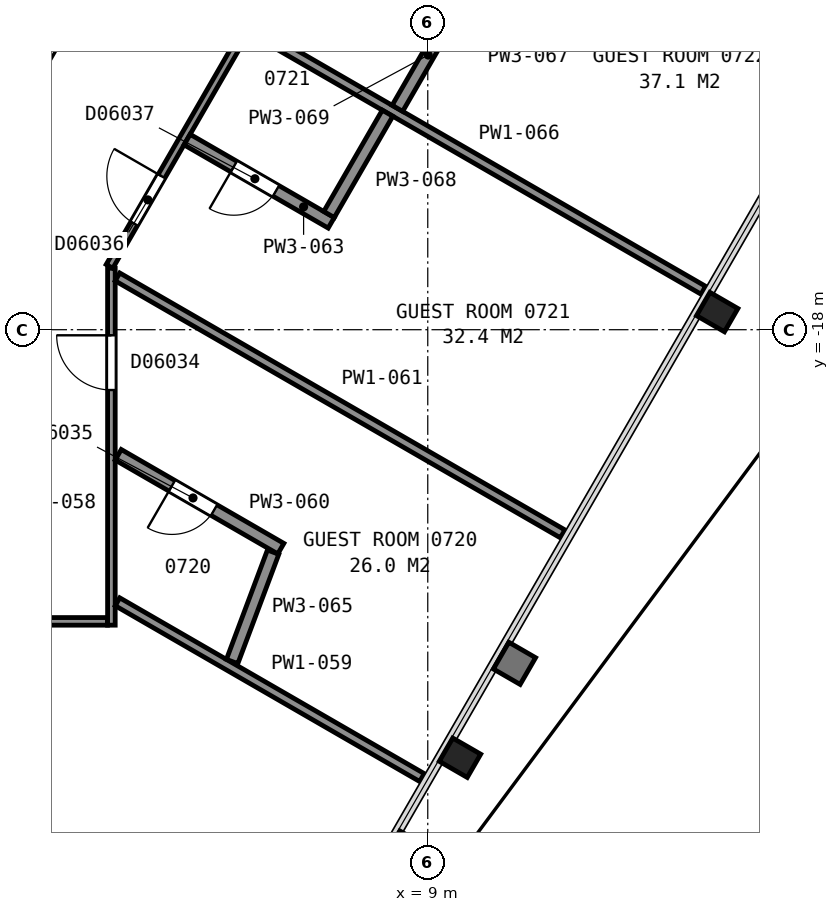
"""IFC4 building model, lengths in metres.
Left out: names, types, materials, properties, quantities, classifications, styles, units other than length and angle.
Written with IfcOpenShell. Run it as: python <this file> out.ifc"""

import sys

from ifc_helpers import new_model, si_unit, direction, frame, frame_2d, origin, origin_2d, place, context, subcontext, project, spatial, rectangle, i_section, extrude, element, fill, save


model = new_model("IFC4")
c1 = context("Model", 3, precision=1e-05, world=origin(), true_north=direction((0.0, 1.0)))
c2 = subcontext(c1, "Body", "Model", "MODEL_VIEW")
j1 = project(units=[si_unit("LENGTHUNIT", "METRE"), si_unit("PLANEANGLEUNIT", "RADIAN")], contexts=[c1])
p1 = place(None, origin())
s1 = spatial("IfcSite", under=j1, at=p1, CompositionType="ELEMENT")
p2 = place(p1, origin())
s2 = spatial("IfcBuilding", under=s1, at=p2, CompositionType="ELEMENT")
p3 = place(p2, frame((0.0, 0.0, 40.4)))
s3 = spatial("IfcBuildingStorey", under=s2, at=p3, CompositionType="ELEMENT", Elevation=40.4)
for number, where, z_axis, x_axis in (
    (1, (9.53, -25.04, 0.0), (0.0, 0.0, 1.0), (-0.5, -0.866, 0.0)),
    (2, (13.76, -17.71, 0.0), (0.0, 0.0, 1.0), (-0.5, -0.866, 0.0)),
):
    element("IfcColumn", number, at=place(p3, frame(where, z_axis=z_axis, x_axis=x_axis)), inside=s3, PredefinedType="COLUMN", context=c2, shape_type="SweptSolid", body=[
        extrude(i_section(OverallWidth=0.442, OverallDepth=0.531, WebThickness=0.066, FlangeThickness=0.106, FilletRadius=0.015, at=origin_2d()), origin(), (0.0, 0.0, 1.0), 3.575),
    ])
p4 = place(p3, frame((1.677, -14.815, 0.0), z_axis=(0.0, 0.0, 1.0), x_axis=(0.49999445743, 0.866028603765, 0.0)))
e3 = element("IfcWall", 3, at=p4, inside=s3, PredefinedType="PARTITIONING", context=c2, shape_type="SweptSolid", body=[
    extrude(rectangle(XDim=5.905, YDim=0.2, at=frame_2d((2.952, 0.0))), origin(), (0.0, 0.0, 1.0), 3.35),
])
p5 = place(p4, frame((3.855, 0.0, 0.0)))
e4 = element("IfcOpeningElement", 4, at=p5, cuts=e3, PredefinedType="OPENING", context=c2, shape_type="SweptSolid", body=[
    extrude(rectangle(XDim=1.8, YDim=2.1, at=frame_2d((0.9, 1.05))), frame((0.0, 0.11, 0.0), z_axis=(0.0, -1.0, 0.0), x_axis=(1.0, 0.0, 0.0)), (0.0, 0.0, 1.0), 0.22),
])
p6 = place(p3, frame((0.333, -22.797, 0.0), z_axis=(0.0, 0.0, 1.0), x_axis=(1.0, 0.0, 0.0)))
e5 = element("IfcWall", 5, at=p6, inside=s3, PredefinedType="PARTITIONING", context=c2, shape_type="SweptSolid", body=[
    extrude(rectangle(XDim=3.399, YDim=0.125, at=frame_2d((1.7, 0.0))), origin(), (0.0, 0.0, 1.0), 2.613),
])
p7 = place(p3, frame((3.797, -16.989, 0.0), z_axis=(0.0, 0.0, 1.0), x_axis=(0.0, -1.0, 0.0)))
e6 = element("IfcWall", 6, at=p7, inside=s3, PredefinedType="PARTITIONING", context=c2, shape_type="SweptSolid", body=[
    extrude(rectangle(XDim=5.871, YDim=0.125, at=frame_2d((2.935, 0.0))), origin(), (0.0, 0.0, 1.0), 2.613),
])
p8 = place(p7, frame((1.103, 0.0, 0.0)))
e7 = element("IfcOpeningElement", 7, at=p8, cuts=e6, PredefinedType="OPENING", context=c2, shape_type="SweptSolid", body=[
    extrude(rectangle(XDim=0.9, YDim=2.1, at=frame_2d((0.45, 1.05))), frame((0.0, 0.073, 0.0), z_axis=(0.0, -1.0, 0.0), x_axis=(1.0, 0.0, 0.0)), (0.0, 0.0, 1.0), 0.145),
])
p9 = place(p3, frame((3.897, -22.475, 0.0), z_axis=(0.0, 0.0, 1.0), x_axis=(0.866025977343, -0.499999006567, 0.0)))
e8 = element("IfcWall", 8, at=p9, inside=s3, PredefinedType="PARTITIONING", context=c2, shape_type="SweptSolid", body=[
    extrude(rectangle(XDim=5.782, YDim=0.15, at=frame_2d((2.891, 0.0))), origin(), (0.0, 0.0, 1.0), 2.613),
])
p10 = place(p3, frame((6.583, -21.601, 0.0), z_axis=(0.0, 0.0, 1.0), x_axis=(-0.865981493415, 0.500076047279, 0.0)))
e9 = element("IfcWall", 9, at=p10, inside=s3, PredefinedType="PARTITIONING", context=c2, shape_type="SweptSolid", body=[
    extrude(rectangle(XDim=3.088, YDim=0.2, at=frame_2d((1.544, 0.0))), origin(), (0.0, 0.0, 1.0), 2.613),
])
p11 = place(p10, frame((1.268, 0.0, 0.0)))
e10 = element("IfcOpeningElement", 10, at=p11, cuts=e9, PredefinedType="OPENING", context=c2, shape_type="SweptSolid", body=[
    extrude(rectangle(XDim=0.8, YDim=2.1, at=frame_2d((0.4, 1.05))), frame((0.0, 0.11, 0.0), z_axis=(0.0, -1.0, 0.0), x_axis=(1.0, 0.0, 0.0)), (0.0, 0.0, 1.0), 0.22),
])
p12 = place(p3, frame((3.897, -17.132, 0.0), z_axis=(0.0, 0.0, 1.0), x_axis=(0.866084603656, -0.499897448793, 0.0)))
e11 = element("IfcWall", 11, at=p12, inside=s3, PredefinedType="PARTITIONING", context=c2, shape_type="SweptSolid", body=[
    extrude(rectangle(XDim=8.454, YDim=0.15, at=frame_2d((4.227, 0.0))), origin(), (0.0, 0.0, 1.0), 2.613),
])
p13 = place(p3, frame((16.967, 5.906, 0.0), z_axis=(0.0, 0.0, 1.0), x_axis=(-0.500024758804, -0.866011108811, 0.0)))
e12 = element("IfcWall", 12, at=p13, inside=s3, PredefinedType="PARTITIONING", context=c2, shape_type="SweptSolid", body=[
    extrude(rectangle(XDim=26.402, YDim=0.125, at=frame_2d((13.201, 0.0))), origin(), (0.0, 0.0, 1.0), 2.613),
])
p14 = place(p13, frame((24.689, 0.0, 0.0)))
e13 = element("IfcOpeningElement", 13, at=p14, cuts=e12, PredefinedType="OPENING", context=c2, shape_type="SweptSolid", body=[
    extrude(rectangle(XDim=0.9, YDim=2.1, at=frame_2d((0.45, 1.05))), frame((0.0, 0.073, 0.0), z_axis=(0.0, -1.0, 0.0), x_axis=(1.0, 0.0, 0.0)), (0.0, 0.0, 1.0), 0.145),
])
p15 = place(p13, frame((17.709, 0.0, 0.0)))
e14 = element("IfcOpeningElement", 14, at=p15, cuts=e12, PredefinedType="OPENING", context=c2, shape_type="SweptSolid", body=[
    extrude(rectangle(XDim=0.9, YDim=2.1, at=frame_2d((0.45, 1.05))), frame((0.0, 0.073, 0.0), z_axis=(0.0, -1.0, 0.0), x_axis=(1.0, 0.0, 0.0)), (0.0, 0.0, 1.0), 0.145),
])
p16 = place(p13, frame((14.928, 0.0, 0.0)))
e15 = element("IfcOpeningElement", 15, at=p16, cuts=e12, PredefinedType="OPENING", context=c2, shape_type="SweptSolid", body=[
    extrude(rectangle(XDim=0.9, YDim=2.1, at=frame_2d((0.45, 1.05))), frame((0.0, 0.073, 0.0), z_axis=(0.0, -1.0, 0.0), x_axis=(1.0, 0.0, 0.0)), (0.0, 0.0, 1.0), 0.145),
])
p17 = place(p13, frame((8.2, 0.0, 0.0)))
e16 = element("IfcOpeningElement", 16, at=p17, cuts=e12, PredefinedType="OPENING", context=c2, shape_type="SweptSolid", body=[
    extrude(rectangle(XDim=0.9, YDim=2.1, at=frame_2d((0.45, 1.05))), frame((0.0, 0.073, 0.0), z_axis=(0.0, -1.0, 0.0), x_axis=(1.0, 0.0, 0.0)), (0.0, 0.0, 1.0), 0.145),
])
p18 = place(p13, frame((5.473, 0.0, 0.0)))
e17 = element("IfcOpeningElement", 17, at=p18, cuts=e12, PredefinedType="OPENING", context=c2, shape_type="SweptSolid", body=[
    extrude(rectangle(XDim=1.0, YDim=2.1, at=frame_2d((0.5, 1.05))), frame((0.0, 0.073, 0.0), z_axis=(0.0, -1.0, 0.0), x_axis=(1.0, 0.0, 0.0)), (0.0, 0.0, 1.0), 0.145),
])
p19 = place(p3, frame((5.042, -14.873, 0.0), z_axis=(0.0, 0.0, 1.0), x_axis=(0.866005850709, -0.50003386539, 0.0)))
e18 = element("IfcWall", 18, at=p19, inside=s3, PredefinedType="PARTITIONING", context=c2, shape_type="SweptSolid", body=[
    extrude(rectangle(XDim=2.737, YDim=0.2, at=frame_2d((1.369, 0.0))), origin(), (0.0, 0.0, 1.0), 2.613),
])
p20 = place(p19, frame((0.887, 0.0, 0.0)))
e19 = element("IfcOpeningElement", 19, at=p20, cuts=e18, PredefinedType="OPENING", context=c2, shape_type="SweptSolid", body=[
    extrude(rectangle(XDim=0.8, YDim=2.1, at=frame_2d((0.4, 1.05))), frame((0.0, 0.11, 0.0), z_axis=(0.0, -1.0, 0.0), x_axis=(1.0, 0.0, 0.0)), (0.0, 0.0, 1.0), 0.22),
])
p21 = place(p3, frame((5.782, -23.457, 0.0), z_axis=(0.0, 0.0, 1.0), x_axis=(0.350942351116, 0.936397066523, 0.0)))
e20 = element("IfcWall", 20, at=p21, inside=s3, PredefinedType="PARTITIONING", context=c2, shape_type="SweptSolid", body=[
    extrude(rectangle(XDim=1.921, YDim=0.2, at=frame_2d((0.96, 0.0))), origin(), (0.0, 0.0, 1.0), 2.613),
])
p22 = place(p3, frame((6.092, -13.055, 0.0), z_axis=(0.0, 0.0, 1.0), x_axis=(0.866002910178, -0.500038958046, 0.0)))
e21 = element("IfcWall", 21, at=p22, inside=s3, PredefinedType="PARTITIONING", context=c2, shape_type="SweptSolid", body=[
    extrude(rectangle(XDim=8.591, YDim=0.15, at=frame_2d((4.295, 0.0))), origin(), (0.0, 0.0, 1.0), 2.613),
])
p23 = place(p3, frame((7.376, -16.105, 0.0), z_axis=(0.0, 0.0, 1.0), x_axis=(0.500095816526, 0.865970077019, 0.0)))
e22 = element("IfcWall", 22, at=p23, inside=s3, PredefinedType="PARTITIONING", context=c2, shape_type="SweptSolid", body=[
    extrude(rectangle(XDim=1.924, YDim=0.2, at=frame_2d((0.962, 0.0))), origin(), (0.0, 0.0, 1.0), 2.613),
])
p24 = place(p3, frame((8.5, -14.359, 0.0), z_axis=(0.0, 0.0, 1.0), x_axis=(0.500042536776, 0.866000843773, 0.0)))
e23 = element("IfcWall", 23, at=p24, inside=s3, PredefinedType="PARTITIONING", context=c2, shape_type="SweptSolid", body=[
    extrude(rectangle(XDim=2.025, YDim=0.2, at=frame_2d((1.012, 0.0))), origin(), (0.0, 0.0, 1.0), 2.613),
])
p25 = place(p8, origin())
e24 = element("IfcDoor", 24, at=p25, inside=s3, OperationType="SINGLE_SWING_LEFT", PredefinedType="DOOR", context=c2, shape_type="SweptSolid", body=[
    extrude(rectangle(XDim=0.9, YDim=2.1, at=frame_2d((0.45, 1.05))), frame((0.0, 0.025, 0.0), z_axis=(0.0, -1.0, 0.0), x_axis=(1.0, 0.0, 0.0)), (0.0, 0.0, 1.0), 0.05),
])
fill(e7, e24)
p26 = place(p11, origin())
e25 = element("IfcDoor", 25, at=p26, inside=s3, OperationType="SINGLE_SWING_RIGHT", PredefinedType="DOOR", context=c2, shape_type="SweptSolid", body=[
    extrude(rectangle(XDim=0.8, YDim=2.1, at=frame_2d((0.4, 1.05))), frame((0.0, 0.025, 0.0), z_axis=(0.0, -1.0, 0.0), x_axis=(1.0, 0.0, 0.0)), (0.0, 0.0, 1.0), 0.05),
])
fill(e10, e25)
p27 = place(p14, origin())
e26 = element("IfcDoor", 26, at=p27, inside=s3, OperationType="SINGLE_SWING_LEFT", PredefinedType="DOOR", context=c2, shape_type="SweptSolid", body=[
    extrude(rectangle(XDim=0.9, YDim=2.1, at=frame_2d((0.45, 1.05))), frame((0.0, 0.025, 0.0), z_axis=(0.0, -1.0, 0.0), x_axis=(1.0, 0.0, 0.0)), (0.0, 0.0, 1.0), 0.05),
])
fill(e13, e26)
p28 = place(p20, origin())
e27 = element("IfcDoor", 27, at=p28, inside=s3, OperationType="SINGLE_SWING_LEFT", PredefinedType="DOOR", context=c2, shape_type="SweptSolid", body=[
    extrude(rectangle(XDim=0.8, YDim=2.1, at=frame_2d((0.4, 1.05))), frame((0.0, 0.025, 0.0), z_axis=(0.0, -1.0, 0.0), x_axis=(1.0, 0.0, 0.0)), (0.0, 0.0, 1.0), 0.05),
])
fill(e19, e27)
save(model, sys.argv[1])
